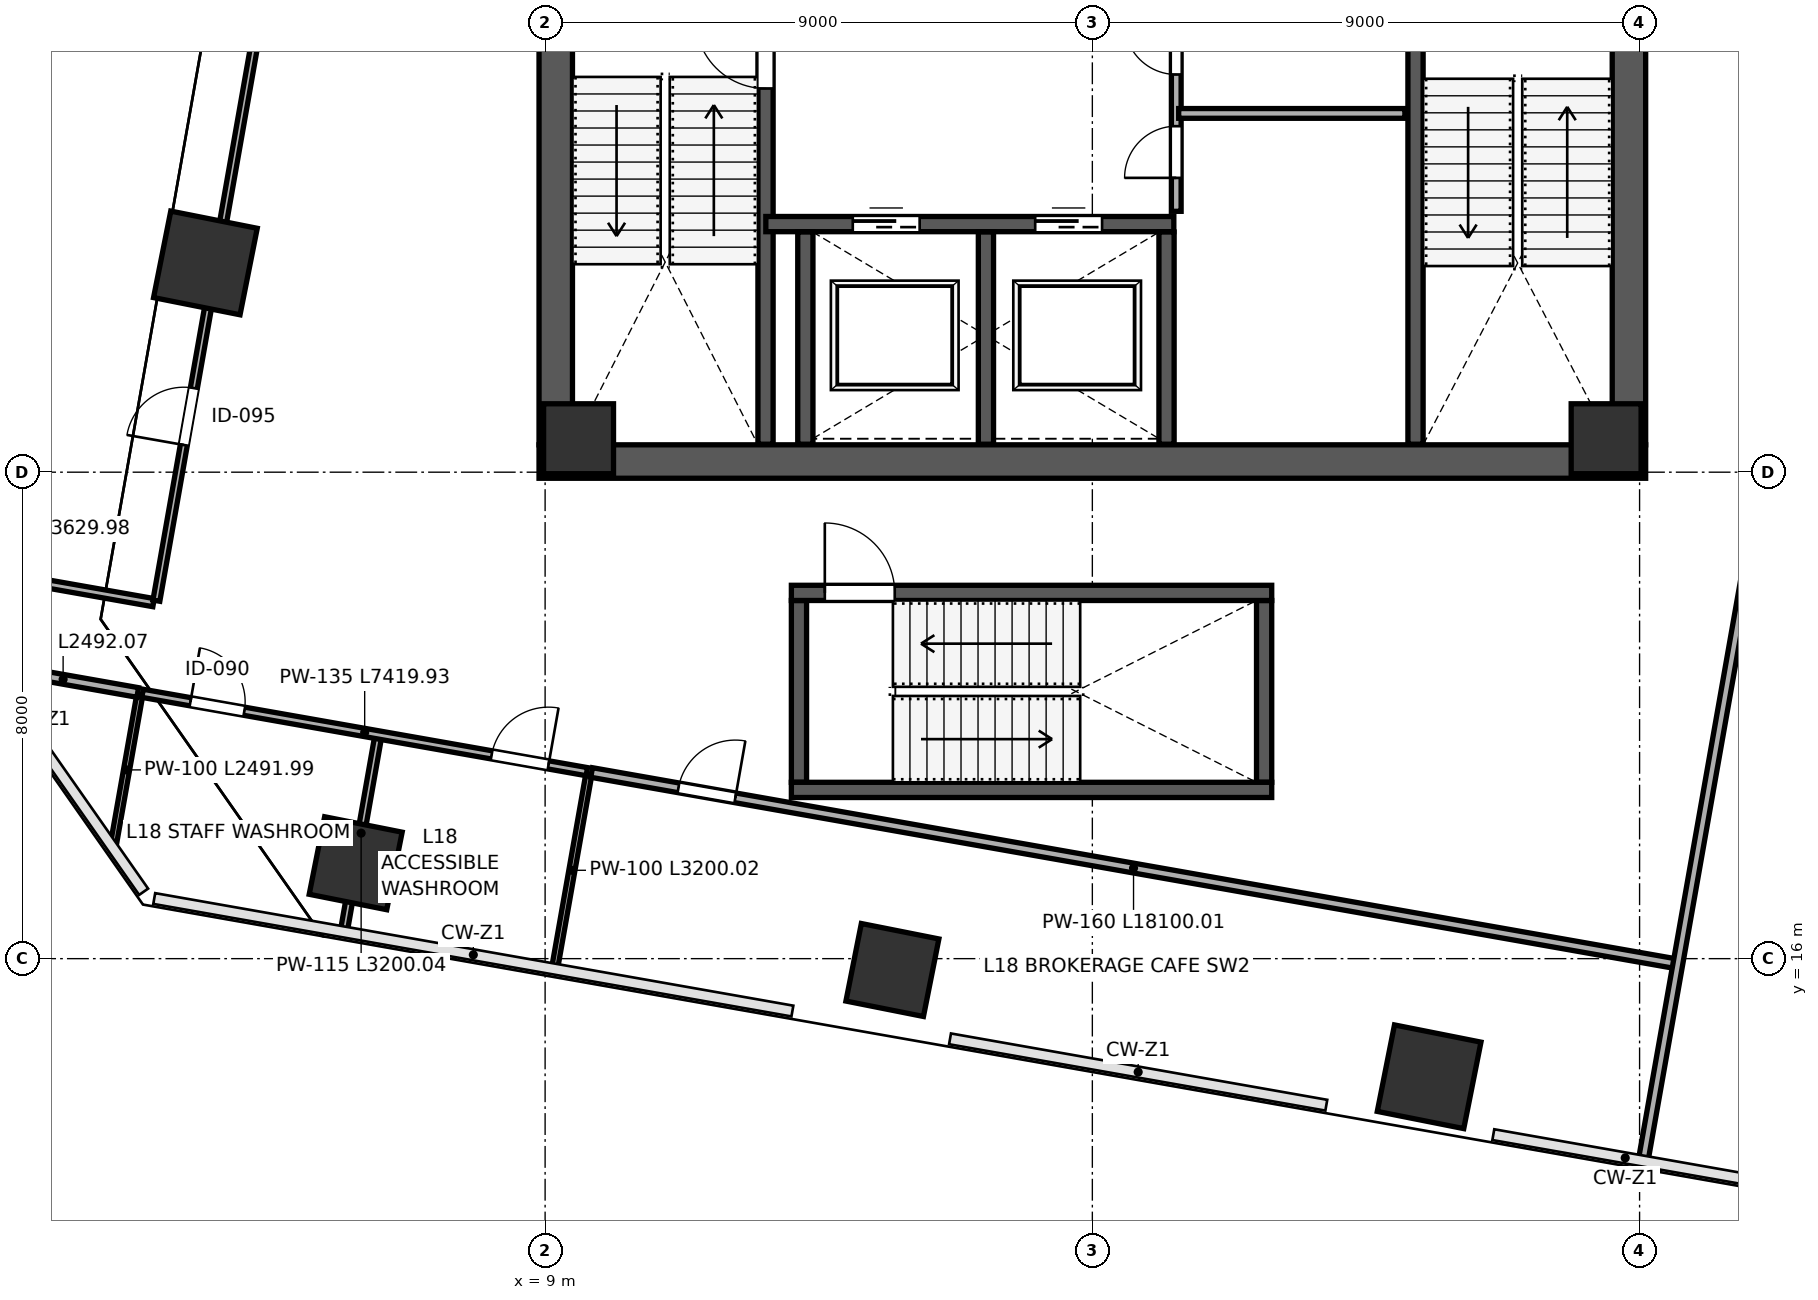
"""IFC4 building model, lengths in metres.
Left out: names, types, materials, properties, quantities, classifications, styles, units other than length and angle.
Written with IfcOpenShell. Run it as: python <this file> out.ifc"""

import sys

from ifc_helpers import new_model, si_unit, direction, frame, frame_2d, origin, origin_2d, place, context, subcontext, project, spatial, rectangle, extrude, clip, halfspace, source, transform, mapped, element, fill, save


model = new_model("IFC4")
c1 = context("Model", 3, precision=1e-05, world=origin(), true_north=direction((0.0, 1.0)))
c2 = subcontext(c1, "Body", "Model", "MODEL_VIEW")
j1 = project(units=[si_unit("LENGTHUNIT", "METRE"), si_unit("PLANEANGLEUNIT", "RADIAN")], contexts=[c1])
p1 = place(None, origin())
s1 = spatial("IfcSite", under=j1, at=p1, CompositionType="ELEMENT")
p2 = place(p1, origin())
s2 = spatial("IfcBuilding", under=s1, at=p2, CompositionType="ELEMENT")
p3 = place(p2, frame((0.0, 0.0, 83.2)))
s3 = spatial("IfcBuildingStorey", under=s2, at=p3, CompositionType="ELEMENT", Elevation=83.2)
m1 = source(origin(), c2, "Body", "SweptSolid", [
    extrude(rectangle(XDim=1.15, YDim=1.15, at=origin_2d()), origin(), (0.0, 0.0, 1.0), 4.198),
])
for number, where, z_axis, x_axis in (
    (1, (9.55, 24.55, 0.001), (0.0, 0.0, 1.0), (1.0, 0.0, 0.0)),
    (2, (26.45, 24.55, 0.001), (0.0, 0.0, 1.0), (1.0, 0.0, 0.0)),
):
    element("IfcColumn", number, at=place(p3, frame(where, z_axis=z_axis, x_axis=x_axis)), inside=s3, PredefinedType="COLUMN", context=c2, shape_type="MappedRepresentation", body=[
        mapped(m1, transform((0.0, 0.0, 0.0), scale=1.0)),
    ])
p4 = place(p3, frame((5.885, 17.569, 0.0), z_axis=(-0.073609459843, 0.081409520345, 0.993958820786), x_axis=(0.857547812534, 0.513958442748, 0.021411873937)))
e3 = element("IfcColumn", 3, at=p4, inside=s3, PredefinedType="COLUMN", context=c2, shape_type="Clipping", body=[
    clip(clip(extrude(rectangle(XDim=1.3, YDim=1.3, at=origin_2d()), origin(), (0.0, 0.0, 1.0), 4.226), halfspace(frame((0.0, 0.0, 0.085), z_axis=(0.0, 0.0, -1.0), x_axis=(1.0, 0.0, 0.0)), False)), halfspace(frame((0.0, 0.0, 4.14), z_axis=(0.0, 0.0, 1.0), x_axis=(1.0, 0.0, 0.0)), False)),
])
p5 = place(p3, frame((14.712, 15.813, 0.0), z_axis=(-0.083360516203, 0.03600711186, 0.99586872239), x_axis=(0.567271375027, 0.823340368185, 0.017715111959)))
e4 = element("IfcColumn", 4, at=p5, inside=s3, PredefinedType="COLUMN", context=c2, shape_type="Clipping", body=[
    clip(clip(extrude(rectangle(XDim=1.3, YDim=1.3, at=origin_2d()), origin(), (0.0, 0.0, 1.0), 4.217), halfspace(frame((0.0, 0.0, 0.07), z_axis=(0.0, 0.0, -1.0), x_axis=(1.0, 0.0, 0.0)), False)), halfspace(frame((0.0, 0.0, 4.147), z_axis=(0.0, 0.0, 1.0), x_axis=(1.0, 0.0, 0.0)), False)),
])
p6 = place(p3, frame((23.539, 14.058, 0.0), z_axis=(-0.092890023876, -0.009549441707, 0.995630579898), x_axis=(0.092919771311, 0.995506926364, 0.018217454851)))
e5 = element("IfcColumn", 5, at=p6, inside=s3, PredefinedType="COLUMN", context=c2, shape_type="Clipping", body=[
    clip(clip(extrude(rectangle(XDim=1.45, YDim=1.45, at=origin_2d()), origin(), (0.0, 0.0, 1.0), 4.218), halfspace(frame((0.0, 0.0, 0.081), z_axis=(0.0, 0.0, -1.0), x_axis=(1.0, 0.0, 0.0)), False)), halfspace(frame((0.0, 0.0, 4.137), z_axis=(0.0, 0.0, 1.0), x_axis=(1.0, 0.0, 0.0)), False)),
])
p7 = place(p3, frame((3.413, 27.441, 0.0), z_axis=(-0.022564738885, 0.093788312134, 0.995336418035), x_axis=(0.998997038041, 0.040629443972, 0.018819305712)))
e6 = element("IfcColumn", 6, at=p7, inside=s3, PredefinedType="COLUMN", context=c2, shape_type="Clipping", body=[
    clip(clip(extrude(rectangle(XDim=1.45, YDim=1.45, at=origin_2d()), origin(), (0.0, 0.0, 1.0), 4.22), halfspace(frame((0.0, 0.0, 0.083), z_axis=(0.0, 0.0, -1.0), x_axis=(1.0, 0.0, 0.0)), False)), halfspace(frame((0.0, 0.0, 4.136), z_axis=(0.0, 0.0, 1.0), x_axis=(1.0, 0.0, 0.0)), False)),
])
p8 = place(p3, frame((9.175, 24.45, 0.0), z_axis=(0.0, 0.0, 1.0), x_axis=(0.0, 1.0, 0.0)))
e7 = element("IfcWall", 7, at=p8, inside=s3, PredefinedType="SHEAR", context=c2, shape_type="SweptSolid", body=[
    extrude(rectangle(XDim=15.1, YDim=0.55, at=frame_2d((7.55, 0.0))), origin(), (0.0, 0.0, 1.0), 3.96),
])
p9 = place(p3, frame((26.825, 24.45, 0.0), z_axis=(0.0, 0.0, 1.0), x_axis=(0.0, 1.0, 0.0)))
e8 = element("IfcWall", 8, at=p9, inside=s3, PredefinedType="SHEAR", context=c2, shape_type="SweptSolid", body=[
    extrude(rectangle(XDim=15.1, YDim=0.55, at=frame_2d((7.55, 0.0))), origin(), (0.0, 0.0, 1.0), 3.96),
])
p10 = place(p9, frame((8.6, 0.0, 0.0)))
e9 = element("IfcOpeningElement", 9, at=p10, cuts=e8, PredefinedType="OPENING", context=c2, shape_type="SweptSolid", body=[
    extrude(rectangle(XDim=1.15, YDim=2.2, at=frame_2d((0.575, 1.1))), frame((0.0, 0.285, 0.0), z_axis=(0.0, -1.0, 0.0), x_axis=(1.0, 0.0, 0.0)), (0.0, 0.0, 1.0), 0.57),
])
p11 = place(p3, frame((8.9, 24.175, 0.0), z_axis=(0.0, 0.0, 1.0), x_axis=(1.0, 0.0, 0.0)))
e10 = element("IfcWall", 10, at=p11, inside=s3, PredefinedType="SHEAR", context=c2, shape_type="SweptSolid", body=[
    extrude(rectangle(XDim=18.2, YDim=0.55, at=frame_2d((9.1, 0.0))), origin(), (0.0, 0.0, 1.0), 3.96),
])
p12 = place(p3, frame((12.625, 24.46, 0.0), z_axis=(0.0, 0.0, 1.0), x_axis=(0.0, 1.0, 0.0)))
e11 = element("IfcWall", 11, at=p12, inside=s3, PredefinedType="SHEAR", context=c2, shape_type="SweptSolid", body=[
    extrude(rectangle(XDim=7.49, YDim=0.25, at=frame_2d((3.745, 0.0))), origin(), (0.0, 0.0, 1.0), 3.96),
])
p13 = place(p12, frame((5.85, 0.0, 0.0)))
e12 = element("IfcOpeningElement", 12, at=p13, cuts=e11, PredefinedType="OPENING", context=c2, shape_type="SweptSolid", body=[
    extrude(rectangle(XDim=1.15, YDim=2.2, at=frame_2d((0.575, 1.1))), frame((0.0, 0.135, 0.0), z_axis=(0.0, -1.0, 0.0), x_axis=(1.0, 0.0, 0.0)), (0.0, 0.0, 1.0), 0.27),
])
p14 = place(p3, frame((23.315, 24.46, 0.0), z_axis=(0.0, 0.0, 1.0), x_axis=(0.0, 1.0, 0.0)))
e13 = element("IfcWall", 13, at=p14, inside=s3, PredefinedType="SHEAR", context=c2, shape_type="SweptSolid", body=[
    extrude(rectangle(XDim=7.49, YDim=0.25, at=frame_2d((3.745, 0.0))), origin(), (0.0, 0.0, 1.0), 3.96),
])
p15 = place(p3, frame((12.63, 28.08, 0.0), z_axis=(0.0, 0.0, 1.0), x_axis=(1.0, 0.0, 0.0)))
e14 = element("IfcWall", 14, at=p15, inside=s3, PredefinedType="SHEAR", context=c2, shape_type="SweptSolid", body=[
    extrude(rectangle(XDim=6.71, YDim=0.25, at=frame_2d((3.355, 0.0))), origin(), (0.0, 0.0, 1.0), 3.96),
])
p16 = place(p15, frame((1.43, 0.0, 0.0)))
e15 = element("IfcOpeningElement", 15, at=p16, cuts=e14, PredefinedType="OPENING", context=c2, shape_type="SweptSolid", body=[
    extrude(rectangle(XDim=1.1, YDim=2.2, at=frame_2d((0.55, 1.1))), frame((0.0, 0.135, 0.0), z_axis=(0.0, -1.0, 0.0), x_axis=(1.0, 0.0, 0.0)), (0.0, 0.0, 1.0), 0.27),
])
p17 = place(p15, frame((4.43, 0.0, 0.0)))
e16 = element("IfcOpeningElement", 16, at=p17, cuts=e14, PredefinedType="OPENING", context=c2, shape_type="SweptSolid", body=[
    extrude(rectangle(XDim=1.1, YDim=2.2, at=frame_2d((0.55, 1.1))), frame((0.0, 0.135, 0.0), z_axis=(0.0, -1.0, 0.0), x_axis=(1.0, 0.0, 0.0)), (0.0, 0.0, 1.0), 0.27),
])
for number, where, z_axis, x_axis in (
    (17, (13.28, 24.46, 0.0), (0.0, 0.0, 1.0), (0.0, 1.0, 0.0)),
    (18, (16.25, 24.46, 0.0), (0.0, 0.0, 1.0), (0.0, 1.0, 0.0)),
    (19, (19.22, 24.46, 0.0), (0.0, 0.0, 1.0), (0.0, 1.0, 0.0)),
):
    element("IfcWall", number, at=place(p3, frame(where, z_axis=z_axis, x_axis=x_axis)), inside=s3, PredefinedType="SHEAR", context=c2, shape_type="SweptSolid", body=[
        extrude(rectangle(XDim=3.49, YDim=0.25, at=frame_2d((1.745, 0.0))), origin(), (0.0, 0.0, 1.0), 3.96),
    ])
for number, where, z_axis, x_axis in (
    (20, (13.175, 18.9, 0.0), (0.0, 0.0, 1.0), (0.0, 1.0, 0.0)),
    (21, (20.825, 18.9, 0.0), (0.0, 0.0, 1.0), (0.0, 1.0, 0.0)),
):
    element("IfcWall", number, at=place(p3, frame(where, z_axis=z_axis, x_axis=x_axis)), inside=s3, PredefinedType="SHEAR", context=c2, shape_type="SweptSolid", body=[
        extrude(rectangle(XDim=2.99, YDim=0.25, at=frame_2d((1.495, 0.0))), origin(), (0.0, 0.0, 1.0), 3.96),
    ])
p18 = place(p3, frame((13.05, 18.775, 0.0), z_axis=(0.0, 0.0, 1.0), x_axis=(1.0, 0.0, 0.0)))
e22 = element("IfcWall", 22, at=p18, inside=s3, PredefinedType="SHEAR", context=c2, shape_type="SweptSolid", body=[
    extrude(rectangle(XDim=7.9, YDim=0.25, at=frame_2d((3.95, 0.0))), origin(), (0.0, 0.0, 1.0), 3.96),
])
p19 = place(p3, frame((13.05, 22.015, 0.0), z_axis=(0.0, 0.0, 1.0), x_axis=(1.0, 0.0, 0.0)))
e23 = element("IfcWall", 23, at=p19, inside=s3, PredefinedType="SHEAR", context=c2, shape_type="SweptSolid", body=[
    extrude(rectangle(XDim=7.9, YDim=0.25, at=frame_2d((3.95, 0.0))), origin(), (0.0, 0.0, 1.0), 3.96),
])
p20 = place(p19, frame((0.55, 0.0, 0.0)))
e24 = element("IfcOpeningElement", 24, at=p20, cuts=e23, PredefinedType="OPENING", context=c2, shape_type="SweptSolid", body=[
    extrude(rectangle(XDim=1.15, YDim=2.2, at=frame_2d((0.575, 1.1))), frame((0.0, 0.135, 0.0), z_axis=(0.0, -1.0, 0.0), x_axis=(1.0, 0.0, 0.0)), (0.0, 0.0, 1.0), 0.27),
])
p21 = place(p3, frame((19.38, 28.29, 0.0), z_axis=(0.0, 0.0, 1.0), x_axis=(0.0, 1.0, 0.0)))
e25 = element("IfcWall", 25, at=p21, inside=s3, PredefinedType="PARTITIONING", context=c2, shape_type="SweptSolid", body=[
    extrude(rectangle(XDim=3.67, YDim=0.16, at=frame_2d((1.835, 0.0))), origin(), (0.0, 0.0, 1.0), 3.96),
])
p22 = place(p21, frame((0.55, 0.0, 0.0)))
e26 = element("IfcOpeningElement", 26, at=p22, cuts=e25, PredefinedType="OPENING", context=c2, shape_type="SweptSolid", body=[
    extrude(rectangle(XDim=0.85, YDim=2.1, at=frame_2d((0.425, 1.05))), frame((0.0, 0.09, 0.0), z_axis=(0.0, -1.0, 0.0), x_axis=(1.0, 0.0, 0.0)), (0.0, 0.0, 1.0), 0.18),
])
p23 = place(p21, frame((2.25, 0.0, 0.0)))
e27 = element("IfcOpeningElement", 27, at=p23, cuts=e25, PredefinedType="OPENING", context=c2, shape_type="SweptSolid", body=[
    extrude(rectangle(XDim=0.85, YDim=2.1, at=frame_2d((0.425, 1.05))), frame((0.0, 0.09, 0.0), z_axis=(0.0, -1.0, 0.0), x_axis=(1.0, 0.0, 0.0)), (0.0, 0.0, 1.0), 0.18),
])
p24 = place(p3, frame((19.42, 29.9, 0.0), z_axis=(0.0, 0.0, 1.0), x_axis=(1.0, 0.0, 0.0)))
e28 = element("IfcWall", 28, at=p24, inside=s3, PredefinedType="PARTITIONING", context=c2, shape_type="SweptSolid", body=[
    extrude(rectangle(XDim=3.72, YDim=0.16, at=frame_2d((1.86, 0.0))), origin(), (0.0, 0.0, 1.0), 3.96),
])
p25 = place(p3, frame((1.9, 17.877, 0.0), z_axis=(0.0, 0.0, 1.0), x_axis=(0.173701499557, 0.984798349436, 0.0)))
e29 = element("IfcWall", 29, at=p25, inside=s3, PredefinedType="PARTITIONING", context=c2, shape_type="SweptSolid", body=[
    extrude(rectangle(XDim=2.492, YDim=0.1, at=frame_2d((1.246, 0.0))), origin(), (0.0, 0.0, 1.0), 3.96),
])
p26 = place(p3, frame((-0.154, 20.81, 0.0), z_axis=(0.0, 0.0, 1.0), x_axis=(0.984798349436, -0.173701499557, 0.0)))
e30 = element("IfcWall", 30, at=p26, inside=s3, PredefinedType="PARTITIONING", context=c2, shape_type="SweptSolid", body=[
    extrude(rectangle(XDim=2.492, YDim=0.16, at=frame_2d((1.246, 0.0))), origin(), (0.0, 0.0, 1.0), 3.96),
])
p27 = place(p3, frame((5.696, 16.489, 0.0), z_axis=(0.0, 0.0, 1.0), x_axis=(0.173720048915, 0.984795077468, 0.0)))
e31 = element("IfcWall", 31, at=p27, inside=s3, PredefinedType="PARTITIONING", context=c2, shape_type="SweptSolid", body=[
    extrude(rectangle(XDim=3.2, YDim=0.115, at=frame_2d((1.6, 0.0))), origin(), (0.0, 0.0, 1.0), 3.095),
])
p28 = place(p3, frame((9.163, 15.877, 0.0), z_axis=(0.0, 0.0, 1.0), x_axis=(0.173646056486, 0.984808127031, 0.0)))
e32 = element("IfcWall", 32, at=p28, inside=s3, PredefinedType="PARTITIONING", context=c2, shape_type="SweptSolid", body=[
    extrude(rectangle(XDim=3.2, YDim=0.1, at=frame_2d((1.6, 0.0))), origin(), (0.0, 0.0, 1.0), 3.095),
])
p29 = place(p3, frame((2.379, 20.364, 0.0), z_axis=(0.0, 0.0, 1.0), x_axis=(0.984810378022, -0.173633289837, 0.0)))
e33 = element("IfcWall", 33, at=p29, inside=s3, PredefinedType="PARTITIONING", context=c2, shape_type="SweptSolid", body=[
    extrude(rectangle(XDim=7.42, YDim=0.135, at=frame_2d((3.71, 0.0))), origin(), (0.0, 0.0, 1.0), 3.96),
])
p30 = place(p29, frame((0.8, 0.0, 0.0)))
e34 = element("IfcOpeningElement", 34, at=p30, cuts=e33, PredefinedType="OPENING", context=c2, shape_type="SweptSolid", body=[
    extrude(rectangle(XDim=0.9, YDim=2.15, at=frame_2d((0.45, 1.075))), frame((0.0, 0.078, 0.0), z_axis=(0.0, -1.0, 0.0), x_axis=(1.0, 0.0, 0.0)), (0.0, 0.0, 1.0), 0.155),
])
p31 = place(p29, frame((5.83, 0.0, 0.0)))
e35 = element("IfcOpeningElement", 35, at=p31, cuts=e33, PredefinedType="OPENING", context=c2, shape_type="SweptSolid", body=[
    extrude(rectangle(XDim=0.95, YDim=2.15, at=frame_2d((0.475, 1.075))), frame((0.0, 0.078, 0.0), z_axis=(0.0, -1.0, 0.0), x_axis=(1.0, 0.0, 0.0)), (0.0, 0.0, 1.0), 0.155),
])
p32 = place(p3, frame((9.765, 19.061, 0.0), z_axis=(0.0, 0.0, 1.0), x_axis=(0.984807312871, -0.173650673815, 0.0)))
e36 = element("IfcWall", 36, at=p32, inside=s3, PredefinedType="PARTITIONING", context=c2, shape_type="SweptSolid", body=[
    extrude(rectangle(XDim=18.1, YDim=0.16, at=frame_2d((9.05, 0.0))), origin(), (0.0, 0.0, 1.0), 3.96),
])
p33 = place(p32, frame((1.45, 0.0, 0.0)))
e37 = element("IfcOpeningElement", 37, at=p33, cuts=e36, PredefinedType="OPENING", context=c2, shape_type="SweptSolid", body=[
    extrude(rectangle(XDim=0.95, YDim=2.15, at=frame_2d((0.475, 1.075))), frame((0.0, 0.09, 0.0), z_axis=(0.0, -1.0, 0.0), x_axis=(1.0, 0.0, 0.0)), (0.0, 0.0, 1.0), 0.18),
])
p34 = place(p3, frame((-1.014, 22.485, 0.0), z_axis=(0.0, 0.0, 1.0), x_axis=(0.984795743306, -0.173716274326, 0.0)))
e38 = element("IfcWall", 38, at=p34, inside=s3, PredefinedType="PARTITIONING", context=c2, shape_type="SweptSolid", body=[
    extrude(rectangle(XDim=3.63, YDim=0.135, at=frame_2d((1.815, 0.0))), origin(), (0.0, 0.0, 1.0), 3.96),
])
p35 = place(p3, frame((2.607, 21.887, 0.0), z_axis=(0.0, 0.0, 1.0), x_axis=(0.173659666579, 0.984805727138, 0.0)))
e39 = element("IfcWall", 39, at=p35, inside=s3, PredefinedType="PARTITIONING", context=c2, shape_type="SweptSolid", body=[
    extrude(rectangle(XDim=24.05, YDim=0.115, at=frame_2d((12.025, 0.0))), origin(), (0.0, 0.0, 1.0), 3.095),
])
p36 = place(p35, frame((2.6, 0.0, 0.0)))
e40 = element("IfcOpeningElement", 40, at=p36, cuts=e39, PredefinedType="OPENING", context=c2, shape_type="SweptSolid", body=[
    extrude(rectangle(XDim=0.95, YDim=2.15, at=frame_2d((0.475, 1.075))), frame((0.0, 0.067, 0.0), z_axis=(0.0, -1.0, 0.0), x_axis=(1.0, 0.0, 0.0)), (0.0, 0.0, 1.0), 0.135),
])
p37 = place(p3, frame((27.067, 12.72, 0.0), z_axis=(0.0, 0.0, 1.0), x_axis=(0.173654514703, 0.984806635601, 0.0)))
e41 = element("IfcWall", 41, at=p37, inside=s3, PredefinedType="PARTITIONING", context=c2, shape_type="SweptSolid", body=[
    extrude(rectangle(XDim=21.08, YDim=0.16, at=frame_2d((10.54, 0.0))), origin(), (0.0, 0.0, 1.0), 3.96),
])
m2 = source(origin(), c2, "Body", "SweptSolid", [
    extrude(rectangle(XDim=1.15, YDim=2.2, at=frame_2d((0.575, 1.1))), frame((0.0, 0.025, 0.0), z_axis=(0.0, -1.0, 0.0), x_axis=(1.0, 0.0, 0.0)), (0.0, 0.0, 1.0), 0.05),
])
p38 = place(p13, origin())
e42 = element("IfcDoor", 42, at=p38, inside=s3, OperationType="SINGLE_SWING_RIGHT", PredefinedType="DOOR", context=c2, shape_type="MappedRepresentation", body=[
    mapped(m2, transform((0.0, 0.0, 0.0), scale=1.0)),
])
fill(e12, e42)
p39 = place(p20, origin())
e43 = element("IfcDoor", 43, at=p39, inside=s3, OperationType="SINGLE_SWING_LEFT", PredefinedType="DOOR", context=c2, shape_type="MappedRepresentation", body=[
    mapped(m2, transform((0.0, 0.0, 0.0), scale=1.0)),
])
fill(e24, e43)
m3 = source(origin(), c2, "Body", "SweptSolid", [
    extrude(rectangle(XDim=1.1, YDim=2.2, at=frame_2d((0.55, 1.1))), frame((0.0, 0.025, 0.0), z_axis=(0.0, -1.0, 0.0), x_axis=(1.0, 0.0, 0.0)), (0.0, 0.0, 1.0), 0.05),
])
p40 = place(p16, origin())
e44 = element("IfcDoor", 44, at=p40, inside=s3, OperationType="SLIDING_TO_LEFT", PredefinedType="DOOR", context=c2, shape_type="MappedRepresentation", body=[
    mapped(m3, transform((0.0, 0.0, 0.0), scale=1.0)),
])
fill(e15, e44)
p41 = place(p17, origin())
e45 = element("IfcDoor", 45, at=p41, inside=s3, OperationType="SLIDING_TO_RIGHT", PredefinedType="DOOR", context=c2, shape_type="MappedRepresentation", body=[
    mapped(m3, transform((0.0, 0.0, 0.0), scale=1.0)),
])
fill(e16, e45)
m4 = source(origin(), c2, "Body", "SweptSolid", [
    extrude(rectangle(XDim=0.85, YDim=2.1, at=frame_2d((0.425, 1.05))), frame((0.0, 0.025, 0.0), z_axis=(0.0, -1.0, 0.0), x_axis=(1.0, 0.0, 0.0)), (0.0, 0.0, 1.0), 0.05),
])
p42 = place(p22, origin())
e46 = element("IfcDoor", 46, at=p42, inside=s3, OperationType="SINGLE_SWING_LEFT", PredefinedType="DOOR", context=c2, shape_type="MappedRepresentation", body=[
    mapped(m4, transform((0.0, 0.0, 0.0), scale=1.0)),
])
fill(e26, e46)
p43 = place(p23, origin())
e47 = element("IfcDoor", 47, at=p43, inside=s3, OperationType="SINGLE_SWING_RIGHT", PredefinedType="DOOR", context=c2, shape_type="MappedRepresentation", body=[
    mapped(m4, transform((0.0, 0.0, 0.0), scale=1.0)),
])
fill(e27, e47)
m5 = source(origin(), c2, "Body", "SweptSolid", [
    extrude(rectangle(XDim=0.9, YDim=2.15, at=frame_2d((0.45, 1.075))), frame((0.0, 0.025, 0.0), z_axis=(0.0, -1.0, 0.0), x_axis=(1.0, 0.0, 0.0)), (0.0, 0.0, 1.0), 0.05),
])
p44 = place(p30, origin())
e48 = element("IfcDoor", 48, at=p44, inside=s3, OperationType="SINGLE_SWING_LEFT", PredefinedType="DOOR", context=c2, shape_type="MappedRepresentation", body=[
    mapped(m5, transform((0.0, 0.0, 0.0), scale=1.0)),
])
fill(e34, e48)
m6 = source(origin(), c2, "Body", "SweptSolid", [
    extrude(rectangle(XDim=0.95, YDim=2.15, at=frame_2d((0.475, 1.075))), frame((0.0, 0.025, 0.0), z_axis=(0.0, -1.0, 0.0), x_axis=(1.0, 0.0, 0.0)), (0.0, 0.0, 1.0), 0.05),
])
p45 = place(p31, origin())
e49 = element("IfcDoor", 49, at=p45, inside=s3, OperationType="SINGLE_SWING_RIGHT", PredefinedType="DOOR", context=c2, shape_type="MappedRepresentation", body=[
    mapped(m6, transform((0.0, 0.0, 0.0), scale=1.0)),
])
fill(e35, e49)
m7 = source(origin(), c2, "Body", "SweptSolid", [
    extrude(rectangle(XDim=0.95, YDim=2.15, at=frame_2d((0.475, 1.075))), frame((0.0, 0.025, 0.0), z_axis=(0.0, -1.0, 0.0), x_axis=(1.0, 0.0, 0.0)), (0.0, 0.0, 1.0), 0.05),
])
p46 = place(p33, origin())
e50 = element("IfcDoor", 50, at=p46, inside=s3, OperationType="SINGLE_SWING_RIGHT", PredefinedType="DOOR", context=c2, shape_type="MappedRepresentation", body=[
    mapped(m7, transform((0.0, 0.0, 0.0), scale=1.0)),
])
fill(e37, e50)
p47 = place(p36, origin())
e51 = element("IfcDoor", 51, at=p47, inside=s3, OperationType="SINGLE_SWING_LEFT", PredefinedType="DOOR", context=c2, shape_type="MappedRepresentation", body=[
    mapped(m6, transform((0.0, 0.0, 0.0), scale=1.0)),
])
fill(e40, e51)
save(model, sys.argv[1])
